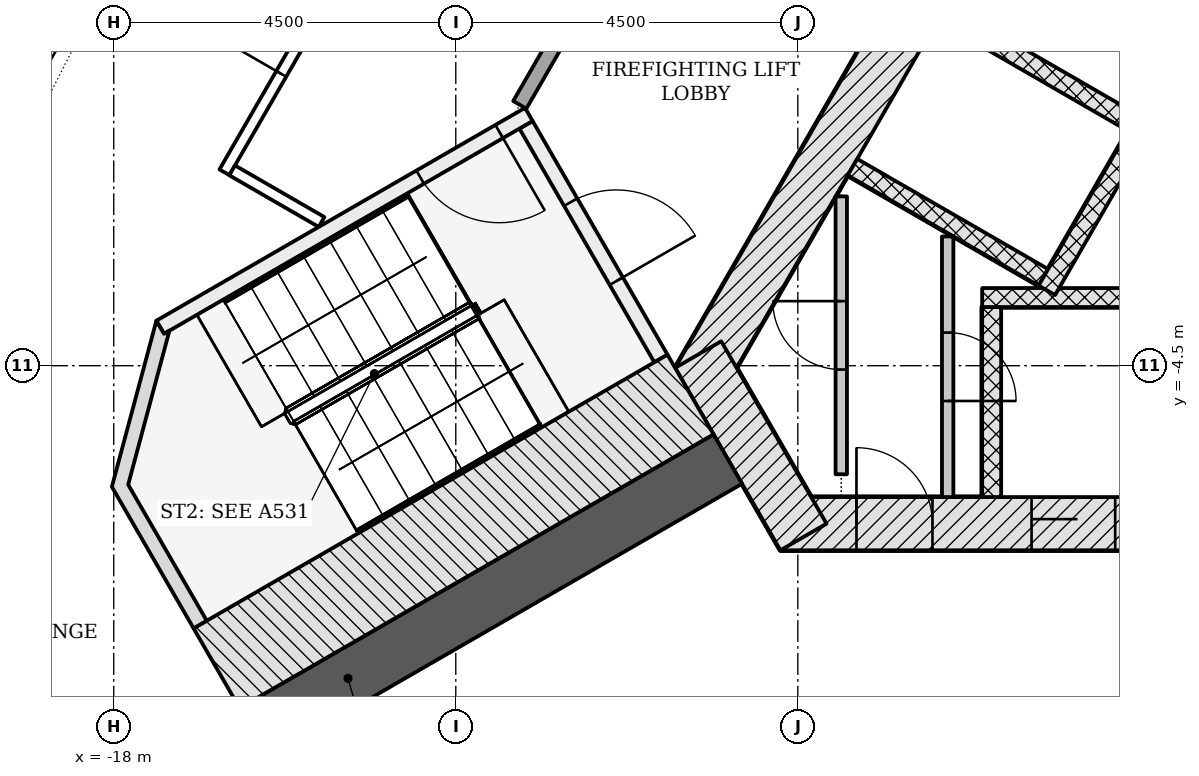
"""IFC4 building model, lengths in metres.
Left out: names, types, materials, properties, quantities, classifications, styles, units other than length and angle.
Written with IfcOpenShell. Run it as: python <this file> out.ifc"""

import sys

from ifc_helpers import new_model, si_unit, direction, frame, frame_2d, origin, place, context, subcontext, project, spatial, polyline, rectangle, outline, extrude, element, fill, save


model = new_model("IFC4")
c1 = context("Model", 3, precision=1e-05, world=origin(), true_north=direction((0.0, 1.0)))
c2 = subcontext(c1, "Body", "Model", "MODEL_VIEW")
j1 = project(units=[si_unit("LENGTHUNIT", "METRE"), si_unit("PLANEANGLEUNIT", "RADIAN")], contexts=[c1])
p1 = place(None, origin())
s1 = spatial("IfcSite", under=j1, at=p1, CompositionType="ELEMENT")
p2 = place(p1, origin())
s2 = spatial("IfcBuilding", under=s1, at=p2, CompositionType="ELEMENT")
p3 = place(p2, frame((0.0, 0.0, 134.7)))
s3 = spatial("IfcBuildingStorey", under=s2, at=p3, CompositionType="ELEMENT", Elevation=134.7)
p4 = place(p3, frame((-9.229, -6.578, -0.3), z_axis=(0.0, 0.0, 1.0), x_axis=(1.0, 0.0, 0.0)))
e1 = element("IfcWall", 1, at=p4, inside=s3, PredefinedType="SHEAR", context=c2, shape_type="SweptSolid", body=[
    extrude(rectangle(XDim=18.458, YDim=0.7, at=frame_2d((9.229, 0.0))), origin(), (0.0, 0.0, 1.0), 5.5),
])
p5 = place(p4, frame((3.304, 0.0, 0.3)))
e2 = element("IfcOpeningElement", 2, at=p5, cuts=e1, PredefinedType="OPENING", context=c2, shape_type="SweptSolid", body=[
    extrude(rectangle(XDim=1.1, YDim=2.1, at=frame_2d((0.55, 1.05))), frame((0.0, 0.36, 0.0), z_axis=(0.0, -1.0, 0.0), x_axis=(1.0, 0.0, 0.0)), (0.0, 0.0, 1.0), 0.72),
])
p6 = place(p4, frame((5.454, 0.0, 0.3)))
e3 = element("IfcOpeningElement", 3, at=p6, cuts=e1, PredefinedType="OPENING", context=c2, shape_type="SweptSolid", body=[
    extrude(rectangle(XDim=1.1, YDim=2.1, at=frame_2d((0.55, 1.05))), frame((0.0, 0.36, 0.0), z_axis=(0.0, -1.0, 0.0), x_axis=(1.0, 0.0, 0.0)), (0.0, 0.0, 1.0), 0.72),
])
p7 = place(p4, frame((7.604, 0.0, 0.3)))
e4 = element("IfcOpeningElement", 4, at=p7, cuts=e1, PredefinedType="OPENING", context=c2, shape_type="SweptSolid", body=[
    extrude(rectangle(XDim=1.1, YDim=2.1, at=frame_2d((0.55, 1.05))), frame((0.0, 0.36, 0.0), z_axis=(0.0, -1.0, 0.0), x_axis=(1.0, 0.0, 0.0)), (0.0, 0.0, 1.0), 0.72),
])
p8 = place(p4, frame((9.754, 0.0, 0.3)))
e5 = element("IfcOpeningElement", 5, at=p8, cuts=e1, PredefinedType="OPENING", context=c2, shape_type="SweptSolid", body=[
    extrude(rectangle(XDim=1.1, YDim=2.1, at=frame_2d((0.55, 1.05))), frame((0.0, 0.36, 0.0), z_axis=(0.0, -1.0, 0.0), x_axis=(1.0, 0.0, 0.0)), (0.0, 0.0, 1.0), 0.72),
])
p9 = place(p4, frame((11.904, 0.0, 0.3)))
e6 = element("IfcOpeningElement", 6, at=p9, cuts=e1, PredefinedType="OPENING", context=c2, shape_type="SweptSolid", body=[
    extrude(rectangle(XDim=1.1, YDim=2.1, at=frame_2d((0.55, 1.05))), frame((0.0, 0.36, 0.0), z_axis=(0.0, -1.0, 0.0), x_axis=(1.0, 0.0, 0.0)), (0.0, 0.0, 1.0), 0.72),
])
p10 = place(p4, frame((14.054, 0.0, 0.3)))
e7 = element("IfcOpeningElement", 7, at=p10, cuts=e1, PredefinedType="OPENING", context=c2, shape_type="SweptSolid", body=[
    extrude(rectangle(XDim=1.1, YDim=2.1, at=frame_2d((0.55, 1.05))), frame((0.0, 0.36, 0.0), z_axis=(0.0, -1.0, 0.0), x_axis=(1.0, 0.0, 0.0)), (0.0, 0.0, 1.0), 0.72),
])
p11 = place(p4, frame((1.0, 0.0, 0.3)))
e8 = element("IfcOpeningElement", 8, at=p11, cuts=e1, PredefinedType="OPENING", context=c2, shape_type="SweptSolid", body=[
    extrude(rectangle(XDim=1.0, YDim=2.1, at=frame_2d((0.5, 1.05))), frame((0.0, 0.36, 0.0), z_axis=(0.0, -1.0, 0.0), x_axis=(1.0, 0.0, 0.0)), (0.0, 0.0, 1.0), 0.72),
])
p12 = place(p4, frame((16.479, 0.0, 0.3)))
e9 = element("IfcOpeningElement", 9, at=p12, cuts=e1, PredefinedType="OPENING", context=c2, shape_type="SweptSolid", body=[
    extrude(rectangle(XDim=0.9, YDim=2.1, at=frame_2d((0.45, 1.05))), frame((0.0, 0.36, 0.0), z_axis=(0.0, -1.0, 0.0), x_axis=(1.0, 0.0, 0.0)), (0.0, 0.0, 1.0), 0.72),
])
p13 = place(p3, frame((-1.083, 11.281, -0.3), z_axis=(0.0, 0.0, 1.0), x_axis=(-0.500001446645, -0.866024568562, 0.0)))
e10 = element("IfcWall", 10, at=p13, inside=s3, PredefinedType="SHEAR", context=c2, shape_type="SweptSolid", body=[
    extrude(rectangle(XDim=18.458, YDim=0.7, at=frame_2d((9.229, 0.0))), origin(), (0.0, 0.0, 1.0), 5.5),
])
p14 = place(p13, frame((4.029, 0.0, 0.3)))
e11 = element("IfcOpeningElement", 11, at=p14, cuts=e10, PredefinedType="OPENING", context=c2, shape_type="SweptSolid", body=[
    extrude(rectangle(XDim=1.4, YDim=2.1, at=frame_2d((0.7, 1.05))), frame((0.0, 0.36, 0.0), z_axis=(0.0, -1.0, 0.0), x_axis=(1.0, 0.0, 0.0)), (0.0, 0.0, 1.0), 0.72),
])
p15 = place(p13, frame((6.579, 0.0, 0.3)))
e12 = element("IfcOpeningElement", 12, at=p15, cuts=e10, PredefinedType="OPENING", context=c2, shape_type="SweptSolid", body=[
    extrude(rectangle(XDim=1.4, YDim=2.1, at=frame_2d((0.7, 1.05))), frame((0.0, 0.36, 0.0), z_axis=(0.0, -1.0, 0.0), x_axis=(1.0, 0.0, 0.0)), (0.0, 0.0, 1.0), 0.72),
])
p16 = place(p13, frame((8.979, 0.0, 0.3)))
e13 = element("IfcOpeningElement", 13, at=p16, cuts=e10, PredefinedType="OPENING", context=c2, shape_type="SweptSolid", body=[
    extrude(rectangle(XDim=1.2, YDim=2.1, at=frame_2d((0.6, 1.05))), frame((0.0, 0.36, 0.0), z_axis=(0.0, -1.0, 0.0), x_axis=(1.0, 0.0, 0.0)), (0.0, 0.0, 1.0), 0.72),
])
p17 = place(p13, frame((11.029, 0.0, 0.3)))
e14 = element("IfcOpeningElement", 14, at=p17, cuts=e10, PredefinedType="OPENING", context=c2, shape_type="SweptSolid", body=[
    extrude(rectangle(XDim=1.2, YDim=2.1, at=frame_2d((0.6, 1.05))), frame((0.0, 0.36, 0.0), z_axis=(0.0, -1.0, 0.0), x_axis=(1.0, 0.0, 0.0)), (0.0, 0.0, 1.0), 0.72),
])
p18 = place(p3, frame((-10.311, -4.353, -0.3), z_axis=(0.0, 0.0, 1.0), x_axis=(0.500042739161, -0.866000726912, 0.0)))
e15 = element("IfcWall", 15, at=p18, inside=s3, PredefinedType="SHEAR", context=c2, shape_type="SweptSolid", body=[
    extrude(rectangle(XDim=2.771, YDim=0.7, at=frame_2d((1.386, 0.0))), origin(), (0.0, 0.0, 1.0), 5.5),
])
p19 = place(p3, frame((-9.922, -5.728, -0.3), z_axis=(0.0, 0.0, 1.0), x_axis=(-0.866024913782, -0.500000848707, 0.0)))
e16 = element("IfcWall", 16, at=p19, inside=s3, PredefinedType="SHEAR", context=c2, shape_type="SweptSolid", body=[
    extrude(rectangle(XDim=11.539, YDim=0.75, at=frame_2d((5.769, 0.0))), origin(), (0.0, 0.0, 1.0), 5.5),
])
p20 = place(p3, origin())
e17 = element("IfcWall", 17, at=p20, inside=s3, PredefinedType="NOTDEFINED", context=c2, shape_type="SweptSolid", body=[
    extrude(outline(polyline([(-22.993, -7.487), (-23.852, -9.322), (-24.257, -10.763), (-24.189, -12.259), (-23.656, -13.658), (-22.711, -14.819), (-21.449, -15.625), (-19.999, -15.995), (-17.98, -16.169), (-17.955, -15.87), (-19.948, -15.699), (-21.328, -15.347), (-22.509, -14.592), (-23.393, -13.506), (-23.891, -12.197), (-23.955, -10.798), (-23.57, -9.426), (-22.721, -7.614), (-22.993, -7.487)])), origin(), (0.0, 0.0, 1.0), 5.2),
])
p21 = place(p3, frame((-6.45, -6.228, -0.3), z_axis=(0.0, 0.0, 1.0), x_axis=(0.0, 1.0, 0.0)))
e18 = element("IfcWall", 18, at=p21, inside=s3, PredefinedType="PARTITIONING", context=c2, shape_type="SweptSolid", body=[
    extrude(rectangle(XDim=2.5, YDim=0.25, at=frame_2d((1.25, 0.0))), origin(), (0.0, 0.0, 1.0), 5.5),
])
p22 = place(p3, frame((-6.575, -3.603, 0.0), z_axis=(0.0, 0.0, 1.0), x_axis=(1.0, 0.0, 0.0)))
e19 = element("IfcWall", 19, at=p22, inside=s3, PredefinedType="PARTITIONING", context=c2, shape_type="SweptSolid", body=[
    extrude(rectangle(XDim=13.15, YDim=0.25, at=frame_2d((6.575, 0.0))), origin(), (0.0, 0.0, 1.0), 5.2),
])
for number, where, z_axis, x_axis in (
    (20, (-7.106, 0.148, -0.3), (0.0, 0.0, 1.0), (0.866, -0.5, 0.0)),
    (21, (-8.281, -1.887, -0.3), (0.0, 0.0, 1.0), (0.866, -0.5, 0.0)),
):
    element("IfcWall", number, at=place(p3, frame(where, z_axis=z_axis, x_axis=x_axis)), inside=s3, PredefinedType="PARTITIONING", context=c2, shape_type="SweptSolid", body=[
        extrude(rectangle(XDim=2.9, YDim=0.25, at=frame_2d((1.45, 0.0))), origin(), (0.0, 0.0, 1.0), 5.5),
    ])
p23 = place(p3, frame((0.176, 6.711, 0.0), z_axis=(0.0, 0.0, 1.0), x_axis=(-0.500004227369, -0.866022963098, 0.0)))
e22 = element("IfcWall", 22, at=p23, inside=s3, PredefinedType="PARTITIONING", context=c2, shape_type="SweptSolid", body=[
    extrude(rectangle(XDim=11.8, YDim=0.25, at=frame_2d((5.9, 0.0))), origin(), (0.0, 0.0, 1.0), 5.2),
])
p24 = place(p3, frame((-8.429, -5.928, 0.0), z_axis=(0.0, 0.0, 1.0), x_axis=(0.0, 1.0, 0.0)))
e23 = element("IfcWall", 23, at=p24, inside=s3, PredefinedType="PARTITIONING", context=c2, shape_type="SweptSolid", body=[
    extrude(rectangle(XDim=3.656, YDim=0.15, at=frame_2d((1.828, 0.0))), origin(), (0.0, 0.0, 1.0), 5.2),
])
p25 = place(p24, frame((1.378, 0.0, 0.0)))
e24 = element("IfcOpeningElement", 24, at=p25, cuts=e23, PredefinedType="OPENING", context=c2, shape_type="SweptSolid", body=[
    extrude(rectangle(XDim=0.9, YDim=2.1, at=frame_2d((0.45, 1.05))), frame((0.0, 0.085, 0.0), z_axis=(0.0, -1.0, 0.0), x_axis=(1.0, 0.0, 0.0)), (0.0, 0.0, 1.0), 0.17),
])
p26 = place(p3, frame((-7.029, -2.8, 0.0), z_axis=(0.0, 0.0, 1.0), x_axis=(0.0, -1.0, 0.0)))
e25 = element("IfcWall", 25, at=p26, inside=s3, PredefinedType="PARTITIONING", context=c2, shape_type="SweptSolid", body=[
    extrude(rectangle(XDim=3.428, YDim=0.15, at=frame_2d((1.714, 0.0))), origin(), (0.0, 0.0, 1.0), 5.2),
])
p27 = place(p26, frame((1.264, 0.0, 0.0)))
e26 = element("IfcOpeningElement", 26, at=p27, cuts=e25, PredefinedType="OPENING", context=c2, shape_type="SweptSolid", body=[
    extrude(rectangle(XDim=0.9, YDim=2.1, at=frame_2d((0.45, 1.05))), frame((0.0, 0.085, 0.0), z_axis=(0.0, -1.0, 0.0), x_axis=(1.0, 0.0, 0.0)), (0.0, 0.0, 1.0), 0.17),
])
p28 = place(p3, frame((-12.576, -1.331, -0.3), z_axis=(0.0, 0.0, 1.0), x_axis=(0.499970499736, -0.8660424351, 0.0)))
e27 = element("IfcWall", 27, at=p28, inside=s3, PredefinedType="SHEAR", context=c2, shape_type="SweptSolid", body=[
    extrude(rectangle(XDim=3.55, YDim=0.2, at=frame_2d((1.775, 0.0))), origin(), (0.0, 0.0, 1.0), 5.5),
])
p29 = place(p28, frame((1.175, 0.0, 0.3)))
e28 = element("IfcOpeningElement", 28, at=p29, cuts=e27, PredefinedType="OPENING", context=c2, shape_type="SweptSolid", body=[
    extrude(rectangle(XDim=1.2, YDim=2.1, at=frame_2d((0.6, 1.05))), frame((0.0, 0.11, 0.0), z_axis=(0.0, -1.0, 0.0), x_axis=(1.0, 0.0, 0.0)), (0.0, 0.0, 1.0), 0.22),
])
p30 = place(p3, frame((-12.539, -1.194, -0.3), z_axis=(0.0, 0.0, 1.0), x_axis=(-0.866045472092, -0.499965239061, 0.0)))
e29 = element("IfcWall", 29, at=p30, inside=s3, PredefinedType="SHEAR", context=c2, shape_type="SweptSolid", body=[
    extrude(rectangle(XDim=5.6, YDim=0.2, at=frame_2d((2.8, 0.0))), origin(), (0.0, 0.0, 1.0), 5.5),
])
p31 = place(p30, frame((0.45, 0.0, 0.3)))
e30 = element("IfcOpeningElement", 30, at=p31, cuts=e29, PredefinedType="OPENING", context=c2, shape_type="SweptSolid", body=[
    extrude(rectangle(XDim=1.2, YDim=2.1, at=frame_2d((0.6, 1.05))), frame((0.0, 0.11, 0.0), z_axis=(0.0, -1.0, 0.0), x_axis=(1.0, 0.0, 0.0)), (0.0, 0.0, 1.0), 0.22),
])
p32 = place(p3, frame((-10.412, -4.879, -0.3), z_axis=(0.0, 0.0, 1.0), x_axis=(-0.866026919366, -0.499997374926, 0.0)))
e31 = element("IfcWall", 31, at=p32, inside=s3, PredefinedType="SHEAR", context=c2, shape_type="SweptSolid", body=[
    extrude(rectangle(XDim=7.2, YDim=1.211, at=frame_2d((3.6, 0.0))), origin(), (0.0, 0.0, 1.0), 5.5),
])
p33 = place(p3, frame((0.0, 0.0, -0.3)))
e32 = element("IfcWall", 32, at=p33, inside=s3, PredefinedType="SHEAR", context=c2, shape_type="SweptSolid", body=[
    extrude(outline(polyline([(-17.439, -3.907), (-18.025, -6.093), (-16.95, -7.955), (-16.777, -7.855), (-17.81, -6.065), (-17.267, -4.039), (-17.339, -4.081), (-17.339, -4.081), (-17.339, -4.081), (-17.339, -4.081), (-17.339, -4.081), (-17.339, -4.081), (-17.339, -4.081), (-17.339, -4.081), (-17.339, -4.081), (-17.339, -4.081), (-17.339, -4.081), (-17.339, -4.081), (-17.339, -4.081), (-17.339, -4.081), (-17.339, -4.081), (-17.339, -4.081), (-17.339, -4.081), (-17.439, -3.907)])), origin(), (0.0, 0.0, 1.0), 5.5),
])
p34 = place(p3, frame((-12.658, -1.068, 0.0), z_axis=(0.0, 0.0, 1.0), x_axis=(0.499996073327, 0.866027670838, 0.0)))
e33 = element("IfcWall", 33, at=p34, inside=s3, PredefinedType="PARTITIONING", context=c2, shape_type="SweptSolid", body=[
    extrude(rectangle(XDim=7.904, YDim=0.2, at=frame_2d((3.952, 0.0))), origin(), (0.0, 0.0, 1.0), 4.647),
])
p35 = place(p34, frame((1.621, 0.0, 0.0)))
e34 = element("IfcOpeningElement", 34, at=p35, cuts=e33, PredefinedType="OPENING", context=c2, shape_type="SweptSolid", body=[
    extrude(rectangle(XDim=1.2, YDim=2.1, at=frame_2d((0.6, 1.05))), frame((0.0, 0.11, 0.0), z_axis=(0.0, -1.0, 0.0), x_axis=(1.0, 0.0, 0.0)), (0.0, 0.0, 1.0), 0.22),
])
p36 = place(p3, frame((-16.544, -1.955, 0.0), z_axis=(0.0, 0.0, 1.0), x_axis=(0.499996823547, 0.866027237703, 0.0)))
e35 = element("IfcWall", 35, at=p36, inside=s3, PredefinedType="PARTITIONING", context=c2, shape_type="SweptSolid", body=[
    extrude(rectangle(XDim=4.057, YDim=0.15, at=frame_2d((2.028, 0.0))), origin(), (0.0, 0.0, 1.0), 4.723),
])
p37 = place(p36, frame((1.495, 0.0, 0.0)))
e36 = element("IfcOpeningElement", 36, at=p37, cuts=e35, PredefinedType="OPENING", context=c2, shape_type="SweptSolid", body=[
    extrude(rectangle(XDim=1.0, YDim=2.1, at=frame_2d((0.5, 1.05))), frame((0.0, 0.085, 0.0), z_axis=(0.0, -1.0, 0.0), x_axis=(1.0, 0.0, 0.0)), (0.0, 0.0, 1.0), 0.17),
])
p38 = place(p3, frame((-16.443, -1.93, 0.0), z_axis=(0.0, 0.0, 1.0), x_axis=(0.866056956396, -0.499945345291, 0.0)))
e37 = element("IfcWall", 37, at=p38, inside=s3, PredefinedType="PARTITIONING", context=c2, shape_type="SweptSolid", body=[
    extrude(rectangle(XDim=1.359, YDim=0.15, at=frame_2d((0.68, 0.0))), origin(), (0.0, 0.0, 1.0), 5.2),
])
p39 = place(p5, origin())
e38 = element("IfcDoor", 38, at=p39, inside=s3, OperationType="DOUBLE_DOOR_SLIDING", PredefinedType="DOOR", context=c2, shape_type="SweptSolid", body=[
    extrude(rectangle(XDim=1.1, YDim=2.1, at=frame_2d((0.55, 1.05))), frame((0.0, 0.025, 0.0), z_axis=(0.0, -1.0, 0.0), x_axis=(1.0, 0.0, 0.0)), (0.0, 0.0, 1.0), 0.05),
])
fill(e2, e38)
p40 = place(p11, origin())
e39 = element("IfcDoor", 39, at=p40, inside=s3, OperationType="SINGLE_SWING_LEFT", PredefinedType="DOOR", context=c2, shape_type="SweptSolid", body=[
    extrude(rectangle(XDim=1.0, YDim=2.1, at=frame_2d((0.5, 1.05))), frame((0.0, 0.075, 0.0), z_axis=(0.0, -1.0, 0.0), x_axis=(1.0, 0.0, 0.0)), (0.0, 0.0, 1.0), 0.15),
])
fill(e8, e39)
p41 = place(p25, origin())
e40 = element("IfcDoor", 40, at=p41, inside=s3, OperationType="SINGLE_SWING_RIGHT", PredefinedType="DOOR", context=c2, shape_type="SweptSolid", body=[
    extrude(rectangle(XDim=0.9, YDim=2.1, at=frame_2d((0.45, 1.05))), frame((0.0, 0.025, 0.0), z_axis=(0.0, -1.0, 0.0), x_axis=(1.0, 0.0, 0.0)), (0.0, 0.0, 1.0), 0.05),
])
fill(e24, e40)
p42 = place(p27, origin())
e41 = element("IfcDoor", 41, at=p42, inside=s3, OperationType="SINGLE_SWING_RIGHT", PredefinedType="DOOR", context=c2, shape_type="SweptSolid", body=[
    extrude(rectangle(XDim=0.9, YDim=2.1, at=frame_2d((0.45, 1.05))), frame((0.0, 0.025, 0.0), z_axis=(0.0, -1.0, 0.0), x_axis=(1.0, 0.0, 0.0)), (0.0, 0.0, 1.0), 0.05),
])
fill(e26, e41)
p43 = place(p29, origin())
e42 = element("IfcDoor", 42, at=p43, inside=s3, OperationType="SINGLE_SWING_RIGHT", PredefinedType="DOOR", context=c2, shape_type="SweptSolid", body=[
    extrude(rectangle(XDim=1.2, YDim=2.1, at=frame_2d((0.6, 1.05))), frame((0.0, 0.025, 0.0), z_axis=(0.0, -1.0, 0.0), x_axis=(1.0, 0.0, 0.0)), (0.0, 0.0, 1.0), 0.05),
])
fill(e28, e42)
p44 = place(p31, origin())
e43 = element("IfcDoor", 43, at=p44, inside=s3, OperationType="SINGLE_SWING_LEFT", PredefinedType="DOOR", context=c2, shape_type="SweptSolid", body=[
    extrude(rectangle(XDim=1.2, YDim=2.1, at=frame_2d((0.6, 1.05))), frame((0.0, 0.025, 0.0), z_axis=(0.0, -1.0, 0.0), x_axis=(1.0, 0.0, 0.0)), (0.0, 0.0, 1.0), 0.05),
])
fill(e30, e43)
p45 = place(p37, origin())
e44 = element("IfcDoor", 44, at=p45, inside=s3, OperationType="SINGLE_SWING_LEFT", PredefinedType="DOOR", context=c2, shape_type="SweptSolid", body=[
    extrude(rectangle(XDim=1.0, YDim=2.1, at=frame_2d((0.5, 1.05))), frame((0.0, 0.025, 0.0), z_axis=(0.0, -1.0, 0.0), x_axis=(1.0, 0.0, 0.0)), (0.0, 0.0, 1.0), 0.05),
])
fill(e36, e44)
save(model, sys.argv[1])
